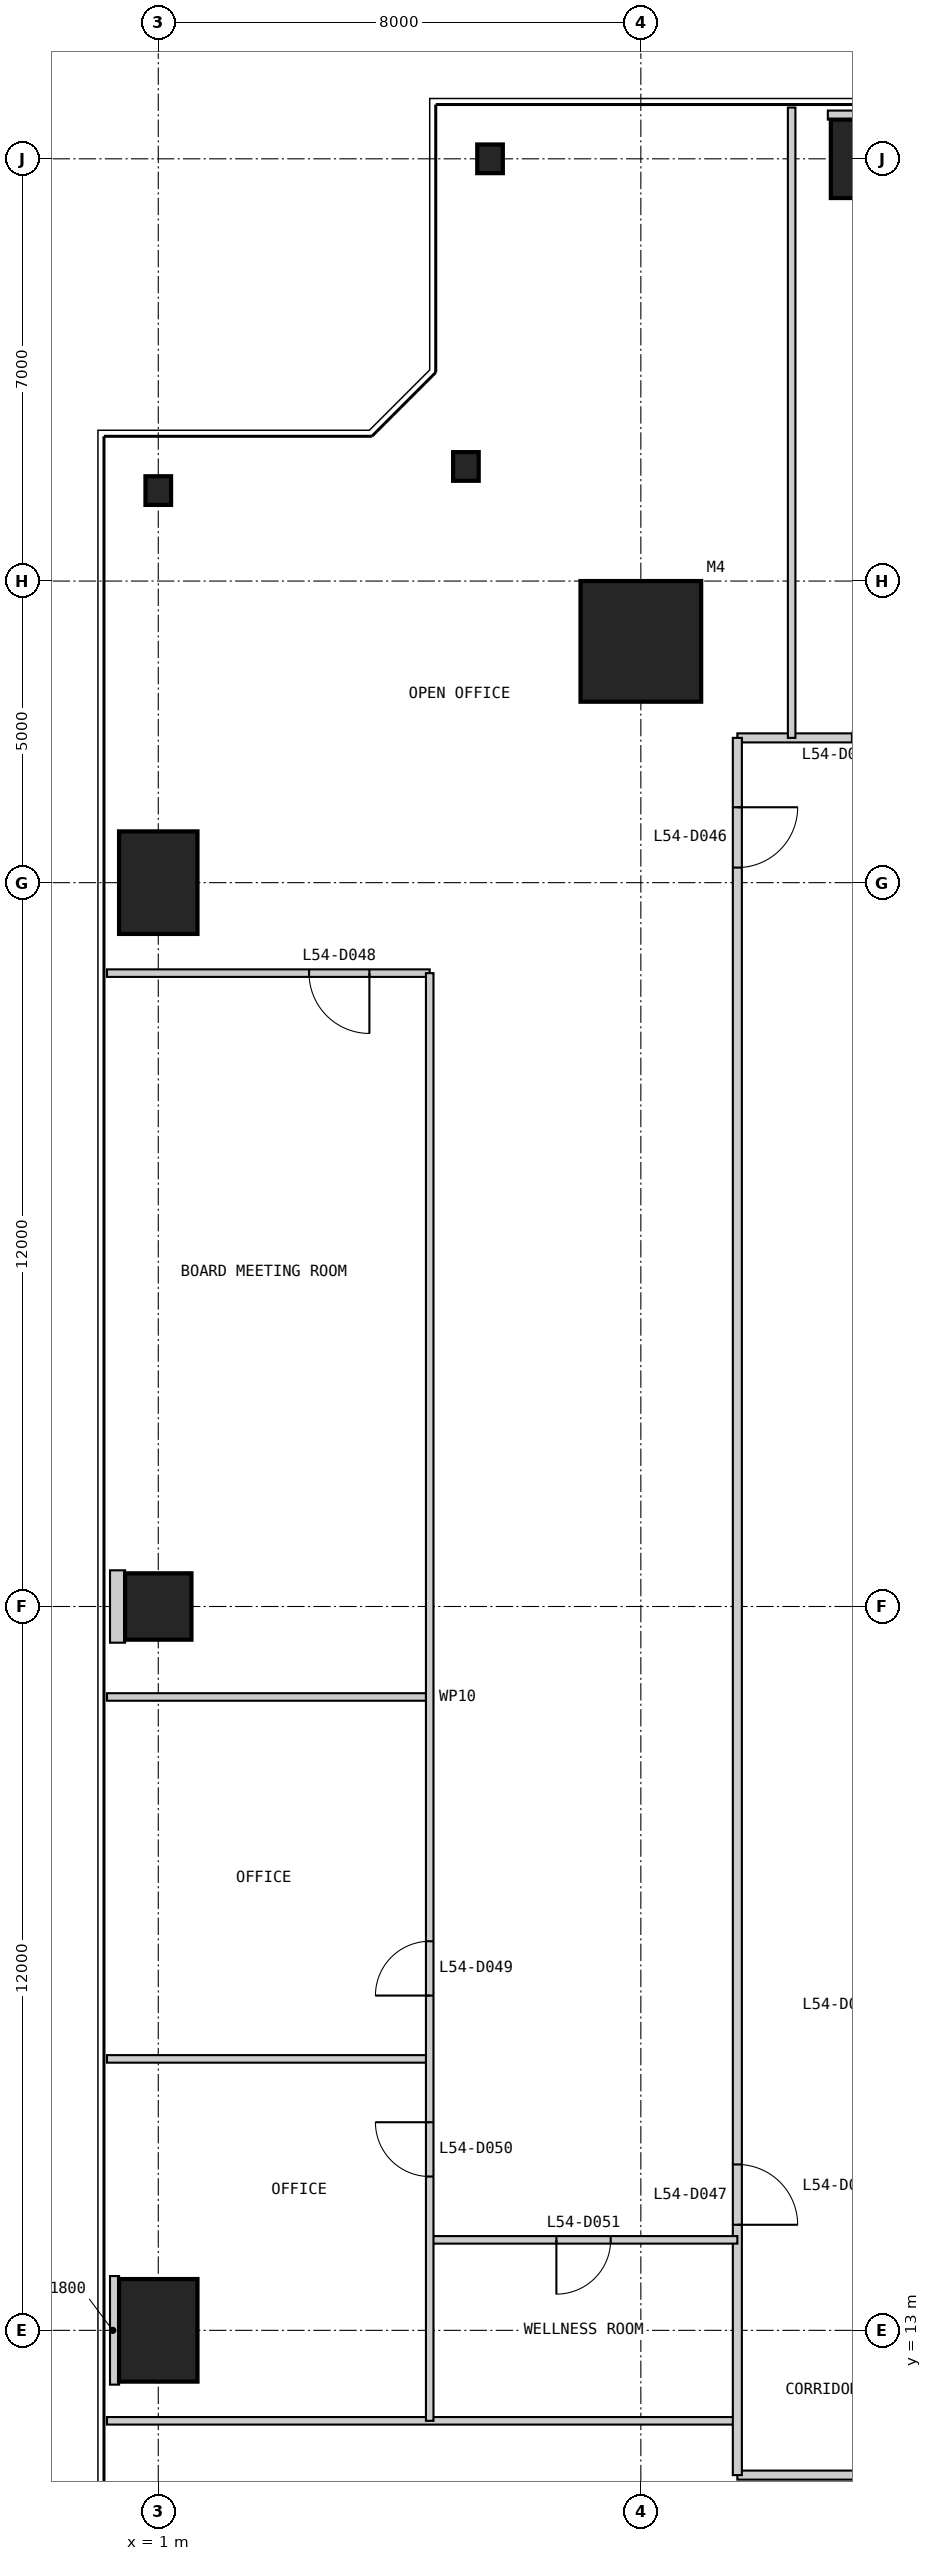
"""IFC4 building model, lengths in metres.
Left out: names, types, materials, properties, quantities, classifications, styles, units other than length and angle.
Written with IfcOpenShell. Run it as: python <this file> out.ifc"""

import sys

from ifc_helpers import new_model, si_unit, direction, frame, frame_2d, origin, origin_2d, place, context, subcontext, project, spatial, rectangle, i_section, extrude, element, fill, save


model = new_model("IFC4")
c1 = context("Model", 3, precision=1e-05, world=origin(), true_north=direction((0.0, 1.0)))
c2 = subcontext(c1, "Body", "Model", "MODEL_VIEW")
j1 = project(units=[si_unit("LENGTHUNIT", "METRE"), si_unit("PLANEANGLEUNIT", "RADIAN")], contexts=[c1])
p1 = place(None, origin())
s1 = spatial("IfcSite", under=j1, at=p1, CompositionType="ELEMENT")
p2 = place(p1, origin())
s2 = spatial("IfcBuilding", under=s1, at=p2, CompositionType="ELEMENT")
p3 = place(p2, frame((0.0, 0.0, 229.8)))
s3 = spatial("IfcBuildingStorey", under=s2, at=p3, CompositionType="ELEMENT", Elevation=229.8)
p4 = place(p3, frame((9.0, 41.0, 0.0), z_axis=(0.0, 0.0, 1.0), x_axis=(1.0, 0.0, 0.0)))
e1 = element("IfcColumn", 1, at=p4, inside=s3, PredefinedType="COLUMN", context=c2, shape_type="SweptSolid", body=[
    extrude(rectangle(XDim=2.0, YDim=2.0, at=origin_2d()), origin(), (0.0, 0.0, 1.0), 4.0),
])
p5 = place(p3, frame((13.0, 49.0, 0.0), z_axis=(0.0, 0.0, 1.0), x_axis=(1.0, 0.0, 0.0)))
e2 = element("IfcColumn", 2, at=p5, inside=s3, PredefinedType="COLUMN", context=c2, shape_type="SweptSolid", body=[
    extrude(rectangle(XDim=1.7, YDim=1.3, at=origin_2d()), origin(), (0.0, 0.0, 1.0), 4.0),
])
for number, where, z_axis, x_axis in (
    (3, (6.5, 49.0, 0.0), (0.0, 0.0, 1.0), (1.0, 0.0, 0.0)),
    (4, (6.1, 43.9, 0.0), (0.0, 0.0, 1.0), (1.0, 0.0, 0.0)),
    (5, (1.0, 43.5, 0.0), (0.0, 0.0, 1.0), (1.0, 0.0, 0.0)),
):
    element("IfcColumn", number, at=place(p3, frame(where, z_axis=z_axis, x_axis=x_axis)), inside=s3, PredefinedType="COLUMN", context=c2, shape_type="SweptSolid", body=[
        extrude(i_section(OverallWidth=0.424, OverallDepth=0.475, WebThickness=0.048, FlangeThickness=0.077, at=origin_2d()), origin(), (0.0, 0.0, 1.0), 4.0),
    ])
p6 = place(p3, frame((1.0, 37.0, 0.0), z_axis=(0.0, 0.0, 1.0), x_axis=(1.0, 0.0, 0.0)))
e6 = element("IfcColumn", 6, at=p6, inside=s3, PredefinedType="COLUMN", context=c2, shape_type="SweptSolid", body=[
    extrude(rectangle(XDim=1.3, YDim=1.7, at=origin_2d()), origin(), (0.0, 0.0, 1.0), 4.0),
])
p7 = place(p3, frame((1.0, 25.0, 0.0), z_axis=(0.0, 0.0, 1.0), x_axis=(1.0, 0.0, 0.0)))
e7 = element("IfcColumn", 7, at=p7, inside=s3, PredefinedType="COLUMN", context=c2, shape_type="SweptSolid", body=[
    extrude(rectangle(XDim=1.1, YDim=1.1, at=origin_2d()), origin(), (0.0, 0.0, 1.0), 4.0),
])
p8 = place(p3, frame((1.0, 13.0, 0.0), z_axis=(0.0, 0.0, 1.0), x_axis=(1.0, 0.0, 0.0)))
e8 = element("IfcColumn", 8, at=p8, inside=s3, PredefinedType="COLUMN", context=c2, shape_type="SweptSolid", body=[
    extrude(rectangle(XDim=1.3, YDim=1.7, at=origin_2d()), origin(), (0.0, 0.0, 1.0), 4.0),
])
p9 = place(p3, frame((10.6, 10.6, 0.0), z_axis=(0.0, 0.0, 1.0), x_axis=(1.0, 0.0, 0.0)))
e9 = element("IfcWall", 9, at=p9, inside=s3, PredefinedType="PARTITIONING", context=c2, shape_type="SweptSolid", body=[
    extrude(rectangle(XDim=28.8, YDim=0.15, at=frame_2d((14.4, 0.0))), origin(), (0.0, 0.0, 1.0), 3.8),
])
p10 = place(p9, frame((10.15, 0.0, 0.0)))
e10 = element("IfcOpeningElement", 10, at=p10, cuts=e9, PredefinedType="OPENING", context=c2, shape_type="SweptSolid", body=[
    extrude(rectangle(XDim=1.0, YDim=2.2, at=frame_2d((0.5, 1.1))), frame((0.0, 0.085, 0.0), z_axis=(0.0, -1.0, 0.0), x_axis=(1.0, 0.0, 0.0)), (0.0, 0.0, 1.0), 0.17),
])
p11 = place(p9, frame((17.65, 0.0, 0.0)))
e11 = element("IfcOpeningElement", 11, at=p11, cuts=e9, PredefinedType="OPENING", context=c2, shape_type="SweptSolid", body=[
    extrude(rectangle(XDim=1.0, YDim=2.2, at=frame_2d((0.5, 1.1))), frame((0.0, 0.085, 0.0), z_axis=(0.0, -1.0, 0.0), x_axis=(1.0, 0.0, 0.0)), (0.0, 0.0, 1.0), 0.17),
])
p12 = place(p9, frame((4.9, 0.0, 0.0)))
e12 = element("IfcOpeningElement", 12, at=p12, cuts=e9, PredefinedType="OPENING", context=c2, shape_type="SweptSolid", body=[
    extrude(rectangle(XDim=1.0, YDim=2.2, at=frame_2d((0.5, 1.1))), frame((0.0, 0.085, 0.0), z_axis=(0.0, -1.0, 0.0), x_axis=(1.0, 0.0, 0.0)), (0.0, 0.0, 1.0), 0.17),
])
p13 = place(p9, frame((22.9, 0.0, 0.0)))
e13 = element("IfcOpeningElement", 13, at=p13, cuts=e9, PredefinedType="OPENING", context=c2, shape_type="SweptSolid", body=[
    extrude(rectangle(XDim=1.0, YDim=2.2, at=frame_2d((0.5, 1.1))), frame((0.0, 0.085, 0.0), z_axis=(0.0, -1.0, 0.0), x_axis=(1.0, 0.0, 0.0)), (0.0, 0.0, 1.0), 0.17),
])
p14 = place(p9, frame((25.9, 0.0, 0.0)))
e14 = element("IfcOpeningElement", 14, at=p14, cuts=e9, PredefinedType="OPENING", context=c2, shape_type="SweptSolid", body=[
    extrude(rectangle(XDim=1.0, YDim=2.2, at=frame_2d((0.5, 1.1))), frame((0.0, 0.085, 0.0), z_axis=(0.0, -1.0, 0.0), x_axis=(1.0, 0.0, 0.0)), (0.0, 0.0, 1.0), 0.17),
])
p15 = place(p3, frame((0.15, 11.5, 0.0), z_axis=(0.0, 0.0, 1.0), x_axis=(1.0, 0.0, 0.0)))
e15 = element("IfcWall", 15, at=p15, inside=s3, PredefinedType="PARTITIONING", context=c2, shape_type="SweptSolid", body=[
    extrude(rectangle(XDim=10.45, YDim=0.125, at=frame_2d((5.225, 0.0))), origin(), (0.0, 0.0, 1.0), 3.8),
])
p16 = place(p3, frame((39.4, 39.4, 0.0), z_axis=(0.0, 0.0, 1.0), x_axis=(-1.0, 0.0, 0.0)))
e16 = element("IfcWall", 16, at=p16, inside=s3, PredefinedType="PARTITIONING", context=c2, shape_type="SweptSolid", body=[
    extrude(rectangle(XDim=28.8, YDim=0.15, at=frame_2d((14.4, 0.0))), origin(), (0.0, 0.0, 1.0), 3.8),
])
p17 = place(p16, frame((10.15, 0.0, 0.0)))
e17 = element("IfcOpeningElement", 17, at=p17, cuts=e16, PredefinedType="OPENING", context=c2, shape_type="SweptSolid", body=[
    extrude(rectangle(XDim=1.0, YDim=2.2, at=frame_2d((0.5, 1.1))), frame((0.0, 0.085, 0.0), z_axis=(0.0, -1.0, 0.0), x_axis=(1.0, 0.0, 0.0)), (0.0, 0.0, 1.0), 0.17),
])
p18 = place(p16, frame((17.65, 0.0, 0.0)))
e18 = element("IfcOpeningElement", 18, at=p18, cuts=e16, PredefinedType="OPENING", context=c2, shape_type="SweptSolid", body=[
    extrude(rectangle(XDim=1.0, YDim=2.2, at=frame_2d((0.5, 1.1))), frame((0.0, 0.085, 0.0), z_axis=(0.0, -1.0, 0.0), x_axis=(1.0, 0.0, 0.0)), (0.0, 0.0, 1.0), 0.17),
])
p19 = place(p16, frame((4.9, 0.0, 0.0)))
e19 = element("IfcOpeningElement", 19, at=p19, cuts=e16, PredefinedType="OPENING", context=c2, shape_type="SweptSolid", body=[
    extrude(rectangle(XDim=1.0, YDim=2.2, at=frame_2d((0.5, 1.1))), frame((0.0, 0.085, 0.0), z_axis=(0.0, -1.0, 0.0), x_axis=(1.0, 0.0, 0.0)), (0.0, 0.0, 1.0), 0.17),
])
p20 = place(p16, frame((22.9, 0.0, 0.0)))
e20 = element("IfcOpeningElement", 20, at=p20, cuts=e16, PredefinedType="OPENING", context=c2, shape_type="SweptSolid", body=[
    extrude(rectangle(XDim=1.0, YDim=2.2, at=frame_2d((0.5, 1.1))), frame((0.0, 0.085, 0.0), z_axis=(0.0, -1.0, 0.0), x_axis=(1.0, 0.0, 0.0)), (0.0, 0.0, 1.0), 0.17),
])
p21 = place(p16, frame((25.9, 0.0, 0.0)))
e21 = element("IfcOpeningElement", 21, at=p21, cuts=e16, PredefinedType="OPENING", context=c2, shape_type="SweptSolid", body=[
    extrude(rectangle(XDim=1.0, YDim=2.2, at=frame_2d((0.5, 1.1))), frame((0.0, 0.085, 0.0), z_axis=(0.0, -1.0, 0.0), x_axis=(1.0, 0.0, 0.0)), (0.0, 0.0, 1.0), 0.17),
])
p22 = place(p3, frame((10.6, 39.4, 0.0), z_axis=(0.0, 0.0, 1.0), x_axis=(0.0, -1.0, 0.0)))
e22 = element("IfcWall", 22, at=p22, inside=s3, PredefinedType="PARTITIONING", context=c2, shape_type="SweptSolid", body=[
    extrude(rectangle(XDim=28.8, YDim=0.15, at=frame_2d((14.4, 0.0))), origin(), (0.0, 0.0, 1.0), 3.8),
])
p23 = place(p22, frame((1.15, 0.0, 0.0)))
e23 = element("IfcOpeningElement", 23, at=p23, cuts=e22, PredefinedType="OPENING", context=c2, shape_type="SweptSolid", body=[
    extrude(rectangle(XDim=1.0, YDim=2.2, at=frame_2d((0.5, 1.1))), frame((0.0, 0.085, 0.0), z_axis=(0.0, -1.0, 0.0), x_axis=(1.0, 0.0, 0.0)), (0.0, 0.0, 1.0), 0.17),
])
p24 = place(p22, frame((23.65, 0.0, 0.0)))
e24 = element("IfcOpeningElement", 24, at=p24, cuts=e22, PredefinedType="OPENING", context=c2, shape_type="SweptSolid", body=[
    extrude(rectangle(XDim=1.0, YDim=2.2, at=frame_2d((0.5, 1.1))), frame((0.0, 0.085, 0.0), z_axis=(0.0, -1.0, 0.0), x_axis=(1.0, 0.0, 0.0)), (0.0, 0.0, 1.0), 0.17),
])
p25 = place(p3, frame((11.5, 49.85, 0.0), z_axis=(0.0, 0.0, 1.0), x_axis=(0.0, -1.0, 0.0)))
e25 = element("IfcWall", 25, at=p25, inside=s3, PredefinedType="PARTITIONING", context=c2, shape_type="SweptSolid", body=[
    extrude(rectangle(XDim=10.45, YDim=0.125, at=frame_2d((5.225, 0.0))), origin(), (0.0, 0.0, 1.0), 3.8),
])
p26 = place(p3, frame((0.15, 35.5, 0.0), z_axis=(0.0, 0.0, 1.0), x_axis=(1.0, 0.0, 0.0)))
e26 = element("IfcWall", 26, at=p26, inside=s3, PredefinedType="PARTITIONING", context=c2, shape_type="SweptSolid", body=[
    extrude(rectangle(XDim=5.35, YDim=0.125, at=frame_2d((2.675, 0.0))), origin(), (0.0, 0.0, 1.0), 3.8),
])
p27 = place(p26, frame((3.35, 0.0, 0.0)))
e27 = element("IfcOpeningElement", 27, at=p27, cuts=e26, PredefinedType="OPENING", context=c2, shape_type="SweptSolid", body=[
    extrude(rectangle(XDim=1.0, YDim=2.2, at=frame_2d((0.5, 1.1))), frame((0.0, 0.073, 0.0), z_axis=(0.0, -1.0, 0.0), x_axis=(1.0, 0.0, 0.0)), (0.0, 0.0, 1.0), 0.145),
])
for number, where, z_axis, x_axis in (
    (28, (0.15, 23.5, 0.0), (0.0, 0.0, 1.0), (1.0, 0.0, 0.0)),
    (29, (0.15, 17.5, 0.0), (0.0, 0.0, 1.0), (1.0, 0.0, 0.0)),
):
    element("IfcWall", number, at=place(p3, frame(where, z_axis=z_axis, x_axis=x_axis)), inside=s3, PredefinedType="PARTITIONING", context=c2, shape_type="SweptSolid", body=[
        extrude(rectangle(XDim=5.35, YDim=0.125, at=frame_2d((2.675, 0.0))), origin(), (0.0, 0.0, 1.0), 3.8),
    ])
p28 = place(p3, frame((5.5, 14.5, 0.0), z_axis=(0.0, 0.0, 1.0), x_axis=(1.0, 0.0, 0.0)))
e30 = element("IfcWall", 30, at=p28, inside=s3, PredefinedType="PARTITIONING", context=c2, shape_type="SweptSolid", body=[
    extrude(rectangle(XDim=5.1, YDim=0.125, at=frame_2d((2.55, 0.0))), origin(), (0.0, 0.0, 1.0), 3.8),
])
p29 = place(p28, frame((2.1, 0.0, 0.0)))
e31 = element("IfcOpeningElement", 31, at=p29, cuts=e30, PredefinedType="OPENING", context=c2, shape_type="SweptSolid", body=[
    extrude(rectangle(XDim=0.9, YDim=2.2, at=frame_2d((0.45, 1.1))), frame((0.0, 0.073, 0.0), z_axis=(0.0, -1.0, 0.0), x_axis=(1.0, 0.0, 0.0)), (0.0, 0.0, 1.0), 0.145),
])
p30 = place(p3, frame((5.5, 35.5, 0.0), z_axis=(0.0, 0.0, 1.0), x_axis=(0.0, -1.0, 0.0)))
e32 = element("IfcWall", 32, at=p30, inside=s3, PredefinedType="PARTITIONING", context=c2, shape_type="SweptSolid", body=[
    extrude(rectangle(XDim=24.0, YDim=0.125, at=frame_2d((12.0, 0.0))), origin(), (0.0, 0.0, 1.0), 3.8),
])
p31 = place(p30, frame((16.05, 0.0, 0.0)))
e33 = element("IfcOpeningElement", 33, at=p31, cuts=e32, PredefinedType="OPENING", context=c2, shape_type="SweptSolid", body=[
    extrude(rectangle(XDim=0.9, YDim=2.2, at=frame_2d((0.45, 1.1))), frame((0.0, 0.073, 0.0), z_axis=(0.0, -1.0, 0.0), x_axis=(1.0, 0.0, 0.0)), (0.0, 0.0, 1.0), 0.145),
])
p32 = place(p30, frame((19.05, 0.0, 0.0)))
e34 = element("IfcOpeningElement", 34, at=p32, cuts=e32, PredefinedType="OPENING", context=c2, shape_type="SweptSolid", body=[
    extrude(rectangle(XDim=0.9, YDim=2.2, at=frame_2d((0.45, 1.1))), frame((0.0, 0.073, 0.0), z_axis=(0.0, -1.0, 0.0), x_axis=(1.0, 0.0, 0.0)), (0.0, 0.0, 1.0), 0.145),
])
p33 = place(p3, frame((13.0, 49.8, 0.0), z_axis=(0.0, 0.0, 1.0), x_axis=(0.0, -1.0, 0.0)))
e35 = element("IfcWall", 35, at=p33, inside=s3, PredefinedType="PARTITIONING", context=c2, shape_type="SweptSolid", body=[
    extrude(rectangle(XDim=0.15, YDim=1.8, at=frame_2d((0.075, 0.0))), origin(), (0.0, 0.0, 1.0), 3.8),
])
p34 = place(p3, frame((0.2, 25.0, 0.0), z_axis=(0.0, 0.0, 1.0), x_axis=(1.0, 0.0, 0.0)))
e36 = element("IfcWall", 36, at=p34, inside=s3, PredefinedType="PARTITIONING", context=c2, shape_type="SweptSolid", body=[
    extrude(rectangle(XDim=0.25, YDim=1.2, at=frame_2d((0.125, 0.0))), origin(), (0.0, 0.0, 1.0), 3.8),
])
p35 = place(p3, frame((0.2, 13.0, 0.0), z_axis=(0.0, 0.0, 1.0), x_axis=(1.0, 0.0, 0.0)))
e37 = element("IfcWall", 37, at=p35, inside=s3, PredefinedType="PARTITIONING", context=c2, shape_type="SweptSolid", body=[
    extrude(rectangle(XDim=0.15, YDim=1.8, at=frame_2d((0.075, 0.0))), origin(), (0.0, 0.0, 1.0), 3.8),
])
p36 = place(p23, origin())
e38 = element("IfcDoor", 38, at=p36, inside=s3, OperationType="SINGLE_SWING_LEFT", PredefinedType="DOOR", context=c2, shape_type="SweptSolid", body=[
    extrude(rectangle(XDim=1.0, YDim=2.2, at=frame_2d((0.5, 1.1))), frame((0.0, 0.025, 0.0), z_axis=(0.0, -1.0, 0.0), x_axis=(1.0, 0.0, 0.0)), (0.0, 0.0, 1.0), 0.05),
])
fill(e23, e38)
p37 = place(p24, origin())
e39 = element("IfcDoor", 39, at=p37, inside=s3, OperationType="SINGLE_SWING_RIGHT", PredefinedType="DOOR", context=c2, shape_type="SweptSolid", body=[
    extrude(rectangle(XDim=1.0, YDim=2.2, at=frame_2d((0.5, 1.1))), frame((0.0, 0.025, 0.0), z_axis=(0.0, -1.0, 0.0), x_axis=(1.0, 0.0, 0.0)), (0.0, 0.0, 1.0), 0.05),
])
fill(e24, e39)
p38 = place(p27, frame((1.0, 0.0, 0.0), z_axis=(0.0, 0.0, 1.0), x_axis=(-1.0, 0.0, 0.0)))
e40 = element("IfcDoor", 40, at=p38, inside=s3, OperationType="SINGLE_SWING_LEFT", PredefinedType="DOOR", context=c2, shape_type="SweptSolid", body=[
    extrude(rectangle(XDim=1.0, YDim=2.2, at=frame_2d((0.5, 1.1))), frame((0.0, 0.025, 0.0), z_axis=(0.0, -1.0, 0.0), x_axis=(1.0, 0.0, 0.0)), (0.0, 0.0, 1.0), 0.05),
])
fill(e27, e40)
p39 = place(p31, frame((0.9, 0.0, 0.0), z_axis=(0.0, 0.0, 1.0), x_axis=(-1.0, 0.0, 0.0)))
e41 = element("IfcDoor", 41, at=p39, inside=s3, OperationType="SINGLE_SWING_LEFT", PredefinedType="DOOR", context=c2, shape_type="SweptSolid", body=[
    extrude(rectangle(XDim=0.9, YDim=2.2, at=frame_2d((0.45, 1.1))), frame((0.0, 0.025, 0.0), z_axis=(0.0, -1.0, 0.0), x_axis=(1.0, 0.0, 0.0)), (0.0, 0.0, 1.0), 0.05),
])
fill(e33, e41)
p40 = place(p32, frame((0.9, 0.0, 0.0), z_axis=(0.0, 0.0, 1.0), x_axis=(-1.0, 0.0, 0.0)))
e42 = element("IfcDoor", 42, at=p40, inside=s3, OperationType="SINGLE_SWING_RIGHT", PredefinedType="DOOR", context=c2, shape_type="SweptSolid", body=[
    extrude(rectangle(XDim=0.9, YDim=2.2, at=frame_2d((0.45, 1.1))), frame((0.0, 0.025, 0.0), z_axis=(0.0, -1.0, 0.0), x_axis=(1.0, 0.0, 0.0)), (0.0, 0.0, 1.0), 0.05),
])
fill(e34, e42)
p41 = place(p29, frame((0.9, 0.0, 0.0), z_axis=(0.0, 0.0, 1.0), x_axis=(-1.0, 0.0, 0.0)))
e43 = element("IfcDoor", 43, at=p41, inside=s3, OperationType="SINGLE_SWING_RIGHT", PredefinedType="DOOR", context=c2, shape_type="SweptSolid", body=[
    extrude(rectangle(XDim=0.9, YDim=2.2, at=frame_2d((0.45, 1.1))), frame((0.0, 0.025, 0.0), z_axis=(0.0, -1.0, 0.0), x_axis=(1.0, 0.0, 0.0)), (0.0, 0.0, 1.0), 0.05),
])
fill(e31, e43)
save(model, sys.argv[1])
